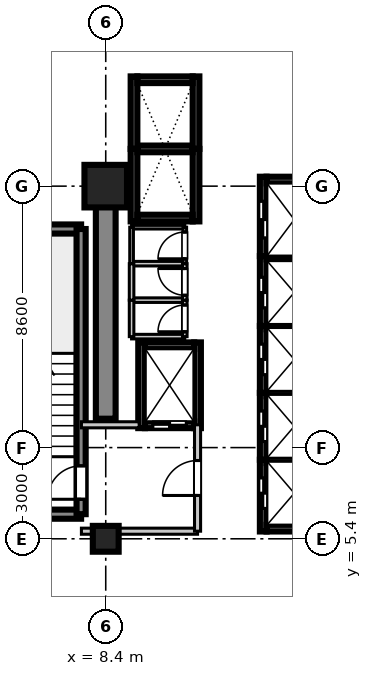
"""IFC4 building model, lengths in metres.
Left out: names, types, materials, properties, quantities, classifications, styles, units other than length and angle.
Written with IfcOpenShell. Run it as: python <this file> out.ifc"""

import sys

from ifc_helpers import new_model, si_unit, direction, frame, frame_2d, origin, origin_2d, place, context, subcontext, project, spatial, rectangle, extrude, source, transform, mapped, element, fill, save


model = new_model("IFC4")
c1 = context("Model", 3, precision=1e-05, world=origin(), true_north=direction((0.0, 1.0)))
c2 = subcontext(c1, "Body", "Model", "MODEL_VIEW")
j1 = project(units=[si_unit("LENGTHUNIT", "METRE"), si_unit("PLANEANGLEUNIT", "RADIAN")], contexts=[c1])
p1 = place(None, origin())
s1 = spatial("IfcSite", under=j1, at=p1, CompositionType="ELEMENT")
p2 = place(p1, origin())
s2 = spatial("IfcBuilding", under=s1, at=p2, CompositionType="ELEMENT")
p3 = place(p2, frame((0.0, 0.0, 32.4)))
s3 = spatial("IfcBuildingStorey", under=s2, at=p3, CompositionType="ELEMENT", Elevation=32.4)
m1 = source(origin(), c2, "Body", "SweptSolid", [
    extrude(rectangle(XDim=0.85, YDim=0.85, at=origin_2d()), origin(), (0.0, 0.0, 1.0), 3.605),
])
p4 = place(p3, frame((8.4, 5.4, 0.0), z_axis=(0.0, 0.0, 1.0), x_axis=(1.0, 0.0, 0.0)))
e1 = element("IfcColumn", 1, at=p4, inside=s3, PredefinedType="PILASTER", context=c2, shape_type="MappedRepresentation", body=[
    mapped(m1, transform((0.0, 0.0, 0.0), scale=1.0)),
])
m2 = source(origin(), c2, "Body", "SweptSolid", [
    extrude(rectangle(XDim=1.4, YDim=1.4, at=origin_2d()), origin(), (0.0, 0.0, 1.0), 3.605),
])
p5 = place(p3, frame((8.4, 17.0, 0.0), z_axis=(0.0, 0.0, 1.0), x_axis=(1.0, 0.0, 0.0)))
e2 = element("IfcColumn", 2, at=p5, inside=s3, PredefinedType="COLUMN", context=c2, shape_type="MappedRepresentation", body=[
    mapped(m2, transform((0.0, 0.0, 0.0), scale=1.0)),
])
m3 = source(origin(), c2, "Body", "SweptSolid", [
    extrude(rectangle(XDim=7.65, YDim=0.65, at=frame_2d((3.825, 0.0))), origin(), (0.0, 0.0, 1.0), 3.37),
])
p6 = place(p3, frame((8.4, 9.35, 0.0), z_axis=(0.0, 0.0, 1.0), x_axis=(0.0, 1.0, 0.0)))
e3 = element("IfcWall", 3, at=p6, inside=s3, PredefinedType="SHEAR", context=c2, shape_type="MappedRepresentation", body=[
    mapped(m3, transform((0.0, 0.0, 0.0), scale=1.0)),
])
m4 = source(origin(), c2, "Body", "SweptSolid", [
    extrude(rectangle(XDim=3.98, YDim=0.3, at=frame_2d((1.99, 0.0))), origin(), (0.0, 0.0, 1.0), 3.37),
])
for number, where, z_axis, x_axis in (
    (4, (3.61, 6.21, 0.0), (0.0, 0.0, 1.0), (1.0, 0.0, 0.0)),
    (5, (3.61, 15.59, 0.0), (0.0, 0.0, 1.0), (1.0, 0.0, 0.0)),
):
    element("IfcWall", number, at=place(p3, frame(where, z_axis=z_axis, x_axis=x_axis)), inside=s3, PredefinedType="SHEAR", context=c2, shape_type="MappedRepresentation", body=[
        mapped(m4, transform((0.0, 0.0, 0.0), scale=1.0)),
    ])
m5 = source(origin(), c2, "Body", "SweptSolid", [
    extrude(rectangle(XDim=9.38, YDim=0.3, at=frame_2d((4.69, 0.0))), origin(), (0.0, 0.0, 1.0), 3.37),
])
p7 = place(p3, frame((7.59, 6.21, 0.0), z_axis=(0.0, 0.0, 1.0), x_axis=(0.0, 1.0, 0.0)))
e6 = element("IfcWall", 6, at=p7, inside=s3, PredefinedType="SHEAR", context=c2, shape_type="MappedRepresentation", body=[
    mapped(m5, transform((0.0, 0.0, 0.0), scale=1.0)),
])
p8 = place(p7, frame((0.49, 0.0, 0.0)))
e7 = element("IfcOpeningElement", 7, at=p8, cuts=e6, PredefinedType="OPENING", context=c2, shape_type="SweptSolid", body=[
    extrude(rectangle(XDim=1.1, YDim=2.15, at=frame_2d((0.55, 1.075))), frame((0.0, 0.16, 0.0), z_axis=(0.0, -1.0, 0.0), x_axis=(1.0, 0.0, 0.0)), (0.0, 0.0, 1.0), 0.32),
])
m6 = source(origin(), c2, "Body", "SweptSolid", [
    extrude(rectangle(XDim=2.36, YDim=0.22, at=frame_2d((1.18, 0.0))), origin(), (0.0, 0.0, 1.0), 3.37),
])
p9 = place(p3, frame((13.58, 5.64, 0.0), z_axis=(0.0, 0.0, 1.0), x_axis=(0.0, 1.0, 0.0)))
e8 = element("IfcWall", 8, at=p9, inside=s3, PredefinedType="SHEAR", context=c2, shape_type="MappedRepresentation", body=[
    mapped(m6, transform((0.0, 0.0, 0.0), scale=1.0)),
])
p10 = place(p9, frame((0.76, 0.0, 0.0)))
e9 = element("IfcOpeningElement", 9, at=p10, cuts=e8, PredefinedType="OPENING", context=c2, shape_type="SweptSolid", body=[
    extrude(rectangle(XDim=1.0, YDim=2.2, at=frame_2d((0.5, 1.1))), frame((0.0, 0.12, 0.0), z_axis=(0.0, -1.0, 0.0), x_axis=(1.0, 0.0, 0.0)), (0.0, 0.0, 1.0), 0.24),
])
m7 = source(origin(), c2, "Body", "SweptSolid", [
    extrude(rectangle(XDim=1.82, YDim=0.22, at=frame_2d((0.91, 0.0))), origin(), (0.0, 0.0, 1.0), 3.37),
])
p11 = place(p3, frame((13.69, 5.75, 0.0), z_axis=(0.0, 0.0, 1.0), x_axis=(1.0, 0.0, 0.0)))
e10 = element("IfcWall", 10, at=p11, inside=s3, PredefinedType="SHEAR", context=c2, shape_type="MappedRepresentation", body=[
    mapped(m7, transform((0.0, 0.0, 0.0), scale=1.0)),
])
m8 = source(origin(), c2, "Body", "SweptSolid", [
    extrude(rectangle(XDim=1.82, YDim=0.22, at=frame_2d((0.91, 0.0))), origin(), (0.0, 0.0, 1.0), 3.65),
])
p12 = place(p3, frame((13.69, 8.0, 0.0), z_axis=(0.0, 0.0, 1.0), x_axis=(1.0, 0.0, 0.0)))
e11 = element("IfcWall", 11, at=p12, inside=s3, PredefinedType="SHEAR", context=c2, shape_type="MappedRepresentation", body=[
    mapped(m8, transform((0.0, 0.0, 0.0), scale=1.0)),
])
m9 = source(origin(), c2, "Body", "SweptSolid", [
    extrude(rectangle(XDim=2.2, YDim=0.22, at=frame_2d((1.1, 0.0))), origin(), (0.0, 0.0, 1.0), 3.37),
])
p13 = place(p3, frame((13.58, 8.0, 0.0), z_axis=(0.0, 0.0, 1.0), x_axis=(0.0, 1.0, 0.0)))
e12 = element("IfcWall", 12, at=p13, inside=s3, PredefinedType="SHEAR", context=c2, shape_type="MappedRepresentation", body=[
    mapped(m9, transform((0.0, 0.0, 0.0), scale=1.0)),
])
p14 = place(p13, frame((0.6, 0.0, 0.0)))
e13 = element("IfcOpeningElement", 13, at=p14, cuts=e12, PredefinedType="OPENING", context=c2, shape_type="SweptSolid", body=[
    extrude(rectangle(XDim=1.0, YDim=2.2, at=frame_2d((0.5, 1.1))), frame((0.0, 0.12, 0.0), z_axis=(0.0, -1.0, 0.0), x_axis=(1.0, 0.0, 0.0)), (0.0, 0.0, 1.0), 0.24),
])
p15 = place(p3, frame((13.69, 10.2, 0.0), z_axis=(0.0, 0.0, 1.0), x_axis=(1.0, 0.0, 0.0)))
e14 = element("IfcWall", 14, at=p15, inside=s3, PredefinedType="SHEAR", context=c2, shape_type="MappedRepresentation", body=[
    mapped(m8, transform((0.0, 0.0, 0.0), scale=1.0)),
])
p16 = place(p3, frame((13.58, 10.2, 0.0), z_axis=(0.0, 0.0, 1.0), x_axis=(0.0, 1.0, 0.0)))
e15 = element("IfcWall", 15, at=p16, inside=s3, PredefinedType="SHEAR", context=c2, shape_type="MappedRepresentation", body=[
    mapped(m9, transform((0.0, 0.0, 0.0), scale=1.0)),
])
p17 = place(p16, frame((0.6, 0.0, 0.0)))
e16 = element("IfcOpeningElement", 16, at=p17, cuts=e15, PredefinedType="OPENING", context=c2, shape_type="SweptSolid", body=[
    extrude(rectangle(XDim=1.0, YDim=2.2, at=frame_2d((0.5, 1.1))), frame((0.0, 0.12, 0.0), z_axis=(0.0, -1.0, 0.0), x_axis=(1.0, 0.0, 0.0)), (0.0, 0.0, 1.0), 0.24),
])
p18 = place(p3, frame((13.69, 12.4, 0.0), z_axis=(0.0, 0.0, 1.0), x_axis=(1.0, 0.0, 0.0)))
e17 = element("IfcWall", 17, at=p18, inside=s3, PredefinedType="SHEAR", context=c2, shape_type="MappedRepresentation", body=[
    mapped(m8, transform((0.0, 0.0, 0.0), scale=1.0)),
])
m10 = source(origin(), c2, "Body", "SweptSolid", [
    extrude(rectangle(XDim=2.3, YDim=0.22, at=frame_2d((1.15, 0.0))), origin(), (0.0, 0.0, 1.0), 3.37),
])
p19 = place(p3, frame((13.58, 12.4, 0.0), z_axis=(0.0, 0.0, 1.0), x_axis=(0.0, 1.0, 0.0)))
e18 = element("IfcWall", 18, at=p19, inside=s3, PredefinedType="SHEAR", context=c2, shape_type="MappedRepresentation", body=[
    mapped(m10, transform((0.0, 0.0, 0.0), scale=1.0)),
])
p20 = place(p19, frame((0.6, 0.0, 0.0)))
e19 = element("IfcOpeningElement", 19, at=p20, cuts=e18, PredefinedType="OPENING", context=c2, shape_type="SweptSolid", body=[
    extrude(rectangle(XDim=1.0, YDim=2.2, at=frame_2d((0.5, 1.1))), frame((0.0, 0.12, 0.0), z_axis=(0.0, -1.0, 0.0), x_axis=(1.0, 0.0, 0.0)), (0.0, 0.0, 1.0), 0.24),
])
p21 = place(p3, frame((13.69, 14.7, 0.0), z_axis=(0.0, 0.0, 1.0), x_axis=(1.0, 0.0, 0.0)))
e20 = element("IfcWall", 20, at=p21, inside=s3, PredefinedType="SHEAR", context=c2, shape_type="MappedRepresentation", body=[
    mapped(m8, transform((0.0, 0.0, 0.0), scale=1.0)),
])
m11 = source(origin(), c2, "Body", "SweptSolid", [
    extrude(rectangle(XDim=2.385, YDim=0.22, at=frame_2d((1.192, 0.0))), origin(), (0.0, 0.0, 1.0), 3.37),
])
for number, where, z_axis, x_axis in (
    (21, (9.33, 15.84, 0.0), (0.0, 0.0, 1.0), (0.0, 1.0, 0.0)),
    (22, (11.37, 15.84, 0.0), (0.0, 0.0, 1.0), (0.0, 1.0, 0.0)),
):
    element("IfcWall", number, at=place(p3, frame(where, z_axis=z_axis, x_axis=x_axis)), inside=s3, PredefinedType="SHEAR", context=c2, shape_type="MappedRepresentation", body=[
        mapped(m11, transform((0.0, 0.0, 0.0), scale=1.0)),
    ])
p22 = place(p3, frame((9.44, 15.95, 0.0), z_axis=(0.0, 0.0, 1.0), x_axis=(1.0, 0.0, 0.0)))
e23 = element("IfcWall", 23, at=p22, inside=s3, PredefinedType="SHEAR", context=c2, shape_type="MappedRepresentation", body=[
    mapped(m7, transform((0.0, 0.0, 0.0), scale=1.0)),
])
p23 = place(p3, frame((9.44, 18.225, 0.0), z_axis=(0.0, 0.0, 1.0), x_axis=(1.0, 0.0, 0.0)))
e24 = element("IfcWall", 24, at=p23, inside=s3, PredefinedType="SHEAR", context=c2, shape_type="MappedRepresentation", body=[
    mapped(m8, transform((0.0, 0.0, 0.0), scale=1.0)),
])
for number, where, z_axis, x_axis in (
    (25, (9.33, 18.225, 0.0), (0.0, 0.0, 1.0), (0.0, 1.0, 0.0)),
    (26, (11.37, 18.225, 0.0), (0.0, 0.0, 1.0), (0.0, 1.0, 0.0)),
):
    element("IfcWall", number, at=place(p3, frame(where, z_axis=z_axis, x_axis=x_axis)), inside=s3, PredefinedType="SHEAR", context=c2, shape_type="MappedRepresentation", body=[
        mapped(m11, transform((0.0, 0.0, 0.0), scale=1.0)),
    ])
p24 = place(p3, frame((9.44, 20.5, 0.0), z_axis=(0.0, 0.0, 1.0), x_axis=(1.0, 0.0, 0.0)))
e27 = element("IfcWall", 27, at=p24, inside=s3, PredefinedType="SHEAR", context=c2, shape_type="MappedRepresentation", body=[
    mapped(m7, transform((0.0, 0.0, 0.0), scale=1.0)),
])
m12 = source(origin(), c2, "Body", "SweptSolid", [
    extrude(rectangle(XDim=2.82, YDim=0.22, at=frame_2d((1.41, 0.0))), origin(), (0.0, 0.0, 1.0), 3.37),
])
for number, where, z_axis, x_axis in (
    (28, (9.58, 9.04, 0.0), (0.0, 0.0, 1.0), (0.0, 1.0, 0.0)),
    (29, (11.42, 9.04, 0.0), (0.0, 0.0, 1.0), (0.0, 1.0, 0.0)),
):
    element("IfcWall", number, at=place(p3, frame(where, z_axis=z_axis, x_axis=x_axis)), inside=s3, PredefinedType="SHEAR", context=c2, shape_type="MappedRepresentation", body=[
        mapped(m12, transform((0.0, 0.0, 0.0), scale=1.0)),
    ])
m13 = source(origin(), c2, "Body", "SweptSolid", [
    extrude(rectangle(XDim=1.62, YDim=0.22, at=frame_2d((0.81, 0.0))), origin(), (0.0, 0.0, 1.0), 3.37),
])
p25 = place(p3, frame((9.69, 9.15, 0.0), z_axis=(0.0, 0.0, 1.0), x_axis=(1.0, 0.0, 0.0)))
e30 = element("IfcWall", 30, at=p25, inside=s3, PredefinedType="SHEAR", context=c2, shape_type="MappedRepresentation", body=[
    mapped(m13, transform((0.0, 0.0, 0.0), scale=1.0)),
])
p26 = place(p25, frame((0.26, 0.0, 0.0)))
e31 = element("IfcOpeningElement", 31, at=p26, cuts=e30, PredefinedType="OPENING", context=c2, shape_type="SweptSolid", body=[
    extrude(rectangle(XDim=1.1, YDim=2.2, at=frame_2d((0.55, 1.1))), frame((0.0, 0.12, 0.0), z_axis=(0.0, -1.0, 0.0), x_axis=(1.0, 0.0, 0.0)), (0.0, 0.0, 1.0), 0.24),
])
p27 = place(p3, frame((9.69, 11.75, 0.0), z_axis=(0.0, 0.0, 1.0), x_axis=(1.0, 0.0, 0.0)))
e32 = element("IfcWall", 32, at=p27, inside=s3, PredefinedType="SHEAR", context=c2, shape_type="MappedRepresentation", body=[
    mapped(m13, transform((0.0, 0.0, 0.0), scale=1.0)),
])
m14 = source(origin(), c2, "Body", "SweptSolid", [
    extrude(rectangle(XDim=2.61, YDim=0.22, at=frame_2d((1.305, 0.0))), origin(), (0.0, 0.0, 1.0), 3.37),
])
p28 = place(p3, frame((13.58, 14.7, 0.0), z_axis=(0.0, 0.0, 1.0), x_axis=(0.0, 1.0, 0.0)))
e33 = element("IfcWall", 33, at=p28, inside=s3, PredefinedType="SHEAR", context=c2, shape_type="MappedRepresentation", body=[
    mapped(m14, transform((0.0, 0.0, 0.0), scale=1.0)),
])
p29 = place(p28, frame((0.6, 0.0, 0.0)))
e34 = element("IfcOpeningElement", 34, at=p29, cuts=e33, PredefinedType="OPENING", context=c2, shape_type="SweptSolid", body=[
    extrude(rectangle(XDim=1.2, YDim=2.2, at=frame_2d((0.6, 1.1))), frame((0.0, 0.12, 0.0), z_axis=(0.0, -1.0, 0.0), x_axis=(1.0, 0.0, 0.0)), (0.0, 0.0, 1.0), 0.24),
])
p30 = place(p3, frame((13.69, 17.2, 0.0), z_axis=(0.0, 0.0, 1.0), x_axis=(1.0, 0.0, 0.0)))
e35 = element("IfcWall", 35, at=p30, inside=s3, PredefinedType="SHEAR", context=c2, shape_type="MappedRepresentation", body=[
    mapped(m7, transform((0.0, 0.0, 0.0), scale=1.0)),
])
m15 = source(origin(), c2, "Body", "SweptSolid", [
    extrude(rectangle(XDim=3.82, YDim=0.2, at=frame_2d((1.91, 0.0))), origin(), (0.0, 0.0, 1.0), 2.71),
])
p31 = place(p3, frame((7.6, 5.65, 0.0), z_axis=(0.0, 0.0, 1.0), x_axis=(1.0, 0.0, 0.0)))
e36 = element("IfcWall", 36, at=p31, inside=s3, PredefinedType="PARTITIONING", context=c2, shape_type="MappedRepresentation", body=[
    mapped(m15, transform((0.0, 0.0, 0.0), scale=1.0)),
])
m16 = source(origin(), c2, "Body", "SweptSolid", [
    extrude(rectangle(XDim=1.9, YDim=0.2, at=frame_2d((0.95, 0.0))), origin(), (0.0, 0.0, 1.0), 2.71),
])
p32 = place(p3, frame((7.6, 9.15, 0.0), z_axis=(0.0, 0.0, 1.0), x_axis=(1.0, 0.0, 0.0)))
e37 = element("IfcWall", 37, at=p32, inside=s3, PredefinedType="PARTITIONING", context=c2, shape_type="MappedRepresentation", body=[
    mapped(m16, transform((0.0, 0.0, 0.0), scale=1.0)),
])
m17 = source(origin(), c2, "Body", "SweptSolid", [
    extrude(rectangle(XDim=3.5, YDim=0.2, at=frame_2d((1.75, 0.0))), origin(), (0.0, 0.0, 1.0), 2.71),
])
p33 = place(p3, frame((11.42, 5.65, 0.0), z_axis=(0.0, 0.0, 1.0), x_axis=(0.0, 1.0, 0.0)))
e38 = element("IfcWall", 38, at=p33, inside=s3, PredefinedType="PARTITIONING", context=c2, shape_type="MappedRepresentation", body=[
    mapped(m17, transform((0.0, 0.0, 0.0), scale=1.0)),
])
p34 = place(p33, frame((1.175, 0.0, 0.0)))
e39 = element("IfcOpeningElement", 39, at=p34, cuts=e38, PredefinedType="OPENING", context=c2, shape_type="SweptSolid", body=[
    extrude(rectangle(XDim=1.15, YDim=2.15, at=frame_2d((0.575, 1.075))), frame((0.0, 0.11, 0.0), z_axis=(0.0, -1.0, 0.0), x_axis=(1.0, 0.0, 0.0)), (0.0, 0.0, 1.0), 0.22),
])
m18 = source(origin(), c2, "Body", "SweptSolid", [
    extrude(rectangle(XDim=1.75, YDim=0.15, at=frame_2d((0.875, 0.0))), origin(), (0.0, 0.0, 1.0), 2.71),
])
for number, where, z_axis, x_axis in (
    (40, (9.25, 12.05, 0.0), (0.0, 0.0, 1.0), (1.0, 0.0, 0.0)),
    (41, (9.25, 13.25, 0.0), (0.0, 0.0, 1.0), (1.0, 0.0, 0.0)),
):
    element("IfcWall", number, at=place(p3, frame(where, z_axis=z_axis, x_axis=x_axis)), inside=s3, PredefinedType="PARTITIONING", context=c2, shape_type="MappedRepresentation", body=[
        mapped(m18, transform((0.0, 0.0, 0.0), scale=1.0)),
    ])
m19 = source(origin(), c2, "Body", "SweptSolid", [
    extrude(rectangle(XDim=1.2, YDim=0.15, at=frame_2d((0.6, 0.0))), origin(), (0.0, 0.0, 1.0), 2.71),
])
p35 = place(p3, frame((9.25, 12.05, 0.0), z_axis=(0.0, 0.0, 1.0), x_axis=(0.0, 1.0, 0.0)))
e42 = element("IfcWall", 42, at=p35, inside=s3, PredefinedType="PARTITIONING", context=c2, shape_type="MappedRepresentation", body=[
    mapped(m19, transform((0.0, 0.0, 0.0), scale=1.0)),
])
p36 = place(p3, frame((11.0, 12.05, 0.0), z_axis=(0.0, 0.0, 1.0), x_axis=(0.0, 1.0, 0.0)))
e43 = element("IfcWall", 43, at=p36, inside=s3, PredefinedType="PARTITIONING", context=c2, shape_type="MappedRepresentation", body=[
    mapped(m19, transform((0.0, 0.0, 0.0), scale=1.0)),
])
p37 = place(p36, frame((0.16, 0.0, 0.0)))
e44 = element("IfcOpeningElement", 44, at=p37, cuts=e43, PredefinedType="OPENING", context=c2, shape_type="SweptSolid", body=[
    extrude(rectangle(XDim=0.88, YDim=2.1, at=frame_2d((0.44, 1.05))), frame((0.0, 0.085, 0.0), z_axis=(0.0, -1.0, 0.0), x_axis=(1.0, 0.0, 0.0)), (0.0, 0.0, 1.0), 0.17),
])
p38 = place(p3, frame((9.25, 14.45, 0.0), z_axis=(0.0, 0.0, 1.0), x_axis=(1.0, 0.0, 0.0)))
e45 = element("IfcWall", 45, at=p38, inside=s3, PredefinedType="PARTITIONING", context=c2, shape_type="MappedRepresentation", body=[
    mapped(m18, transform((0.0, 0.0, 0.0), scale=1.0)),
])
p39 = place(p3, frame((9.25, 13.25, 0.0), z_axis=(0.0, 0.0, 1.0), x_axis=(0.0, 1.0, 0.0)))
e46 = element("IfcWall", 46, at=p39, inside=s3, PredefinedType="PARTITIONING", context=c2, shape_type="MappedRepresentation", body=[
    mapped(m19, transform((0.0, 0.0, 0.0), scale=1.0)),
])
p40 = place(p3, frame((11.0, 13.25, 0.0), z_axis=(0.0, 0.0, 1.0), x_axis=(0.0, 1.0, 0.0)))
e47 = element("IfcWall", 47, at=p40, inside=s3, PredefinedType="PARTITIONING", context=c2, shape_type="MappedRepresentation", body=[
    mapped(m19, transform((0.0, 0.0, 0.0), scale=1.0)),
])
p41 = place(p40, frame((0.16, 0.0, 0.0)))
e48 = element("IfcOpeningElement", 48, at=p41, cuts=e47, PredefinedType="OPENING", context=c2, shape_type="SweptSolid", body=[
    extrude(rectangle(XDim=0.88, YDim=2.1, at=frame_2d((0.44, 1.05))), frame((0.0, 0.085, 0.0), z_axis=(0.0, -1.0, 0.0), x_axis=(1.0, 0.0, 0.0)), (0.0, 0.0, 1.0), 0.17),
])
m20 = source(origin(), c2, "Body", "SweptSolid", [
    extrude(rectangle(XDim=1.75, YDim=0.12, at=frame_2d((0.875, 0.0))), origin(), (0.0, 0.0, 1.0), 2.71),
])
p42 = place(p3, frame((9.25, 15.65, 0.0), z_axis=(0.0, 0.0, 1.0), x_axis=(1.0, 0.0, 0.0)))
e49 = element("IfcWall", 49, at=p42, inside=s3, PredefinedType="PARTITIONING", context=c2, shape_type="MappedRepresentation", body=[
    mapped(m20, transform((0.0, 0.0, 0.0), scale=1.0)),
])
m21 = source(origin(), c2, "Body", "SweptSolid", [
    extrude(rectangle(XDim=1.2, YDim=0.12, at=frame_2d((0.6, 0.0))), origin(), (0.0, 0.0, 1.0), 2.71),
])
p43 = place(p3, frame((9.25, 14.45, 0.0), z_axis=(0.0, 0.0, 1.0), x_axis=(0.0, 1.0, 0.0)))
e50 = element("IfcWall", 50, at=p43, inside=s3, PredefinedType="PARTITIONING", context=c2, shape_type="MappedRepresentation", body=[
    mapped(m21, transform((0.0, 0.0, 0.0), scale=1.0)),
])
p44 = place(p3, frame((11.0, 14.45, 0.0), z_axis=(0.0, 0.0, 1.0), x_axis=(0.0, 1.0, 0.0)))
e51 = element("IfcWall", 51, at=p44, inside=s3, PredefinedType="PARTITIONING", context=c2, shape_type="MappedRepresentation", body=[
    mapped(m21, transform((0.0, 0.0, 0.0), scale=1.0)),
])
p45 = place(p44, frame((0.16, 0.0, 0.0)))
e52 = element("IfcOpeningElement", 52, at=p45, cuts=e51, PredefinedType="OPENING", context=c2, shape_type="SweptSolid", body=[
    extrude(rectangle(XDim=0.88, YDim=2.1, at=frame_2d((0.44, 1.05))), frame((0.0, 0.07, 0.0), z_axis=(0.0, -1.0, 0.0), x_axis=(1.0, 0.0, 0.0)), (0.0, 0.0, 1.0), 0.14),
])
m22 = source(origin(), c2, "Body", "SweptSolid", [
    extrude(rectangle(XDim=1.1, YDim=2.15, at=frame_2d((0.55, 1.075))), frame((0.0, 0.025, 0.0), z_axis=(0.0, -1.0, 0.0), x_axis=(1.0, 0.0, 0.0)), (0.0, 0.0, 1.0), 0.05),
])
p46 = place(p8, origin())
e53 = element("IfcDoor", 53, at=p46, inside=s3, OperationType="SINGLE_SWING_LEFT", PredefinedType="DOOR", context=c2, shape_type="MappedRepresentation", body=[
    mapped(m22, transform((0.0, 0.0, 0.0), scale=1.0)),
])
fill(e7, e53)
m23 = source(origin(), c2, "Body", "SweptSolid", [
    extrude(rectangle(XDim=1.0, YDim=2.2, at=frame_2d((0.5, 1.1))), frame((0.0, 0.025, 0.0), z_axis=(0.0, -1.0, 0.0), x_axis=(1.0, 0.0, 0.0)), (0.0, 0.0, 1.0), 0.05),
])
p47 = place(p10, origin())
e54 = element("IfcDoor", 54, at=p47, inside=s3, OperationType="DOUBLE_DOOR_SLIDING", PredefinedType="DOOR", context=c2, shape_type="MappedRepresentation", body=[
    mapped(m23, transform((0.0, 0.0, 0.0), scale=1.0)),
])
fill(e9, e54)
p48 = place(p14, origin())
e55 = element("IfcDoor", 55, at=p48, inside=s3, OperationType="DOUBLE_DOOR_SLIDING", PredefinedType="DOOR", context=c2, shape_type="MappedRepresentation", body=[
    mapped(m23, transform((0.0, 0.0, 0.0), scale=1.0)),
])
fill(e13, e55)
p49 = place(p17, origin())
e56 = element("IfcDoor", 56, at=p49, inside=s3, OperationType="DOUBLE_DOOR_SLIDING", PredefinedType="DOOR", context=c2, shape_type="MappedRepresentation", body=[
    mapped(m23, transform((0.0, 0.0, 0.0), scale=1.0)),
])
fill(e16, e56)
p50 = place(p20, origin())
e57 = element("IfcDoor", 57, at=p50, inside=s3, OperationType="DOUBLE_DOOR_SLIDING", PredefinedType="DOOR", context=c2, shape_type="MappedRepresentation", body=[
    mapped(m23, transform((0.0, 0.0, 0.0), scale=1.0)),
])
fill(e19, e57)
m24 = source(origin(), c2, "Body", "SweptSolid", [
    extrude(rectangle(XDim=1.1, YDim=2.2, at=frame_2d((0.55, 1.1))), frame((0.0, 0.025, 0.0), z_axis=(0.0, -1.0, 0.0), x_axis=(1.0, 0.0, 0.0)), (0.0, 0.0, 1.0), 0.05),
])
p51 = place(p26, frame((1.1, 0.0, 0.0), z_axis=(0.0, 0.0, 1.0), x_axis=(-1.0, 0.0, 0.0)))
e58 = element("IfcDoor", 58, at=p51, inside=s3, OperationType="DOUBLE_DOOR_SLIDING", PredefinedType="DOOR", context=c2, shape_type="MappedRepresentation", body=[
    mapped(m24, transform((0.0, 0.0, 0.0), scale=1.0)),
])
fill(e31, e58)
m25 = source(origin(), c2, "Body", "SweptSolid", [
    extrude(rectangle(XDim=1.2, YDim=2.2, at=frame_2d((0.6, 1.1))), frame((0.0, 0.025, 0.0), z_axis=(0.0, -1.0, 0.0), x_axis=(1.0, 0.0, 0.0)), (0.0, 0.0, 1.0), 0.05),
])
p52 = place(p29, origin())
e59 = element("IfcDoor", 59, at=p52, inside=s3, OperationType="DOUBLE_DOOR_SLIDING", PredefinedType="DOOR", context=c2, shape_type="MappedRepresentation", body=[
    mapped(m25, transform((0.0, 0.0, 0.0), scale=1.0)),
])
fill(e34, e59)
m26 = source(origin(), c2, "Body", "SweptSolid", [
    extrude(rectangle(XDim=1.15, YDim=2.15, at=frame_2d((0.575, 1.075))), frame((0.0, 0.025, 0.0), z_axis=(0.0, -1.0, 0.0), x_axis=(1.0, 0.0, 0.0)), (0.0, 0.0, 1.0), 0.05),
])
p53 = place(p34, frame((1.15, 0.0, 0.0), z_axis=(0.0, 0.0, 1.0), x_axis=(-1.0, 0.0, 0.0)))
e60 = element("IfcDoor", 60, at=p53, inside=s3, OperationType="SINGLE_SWING_LEFT", PredefinedType="DOOR", context=c2, shape_type="MappedRepresentation", body=[
    mapped(m26, transform((0.0, 0.0, 0.0), scale=1.0)),
])
fill(e39, e60)
m27 = source(origin(), c2, "Body", "SweptSolid", [
    extrude(rectangle(XDim=0.88, YDim=2.1, at=frame_2d((0.44, 1.05))), frame((0.0, 0.025, 0.0), z_axis=(0.0, -1.0, 0.0), x_axis=(1.0, 0.0, 0.0)), (0.0, 0.0, 1.0), 0.05),
])
p54 = place(p37, origin())
e61 = element("IfcDoor", 61, at=p54, inside=s3, OperationType="SINGLE_SWING_LEFT", PredefinedType="DOOR", context=c2, shape_type="MappedRepresentation", body=[
    mapped(m27, transform((0.0, 0.0, 0.0), scale=1.0)),
])
fill(e44, e61)
p55 = place(p41, origin())
e62 = element("IfcDoor", 62, at=p55, inside=s3, OperationType="SINGLE_SWING_RIGHT", PredefinedType="DOOR", context=c2, shape_type="MappedRepresentation", body=[
    mapped(m27, transform((0.0, 0.0, 0.0), scale=1.0)),
])
fill(e48, e62)
p56 = place(p45, origin())
e63 = element("IfcDoor", 63, at=p56, inside=s3, OperationType="SINGLE_SWING_LEFT", PredefinedType="DOOR", context=c2, shape_type="MappedRepresentation", body=[
    mapped(m27, transform((0.0, 0.0, 0.0), scale=1.0)),
])
fill(e52, e63)
save(model, sys.argv[1])
